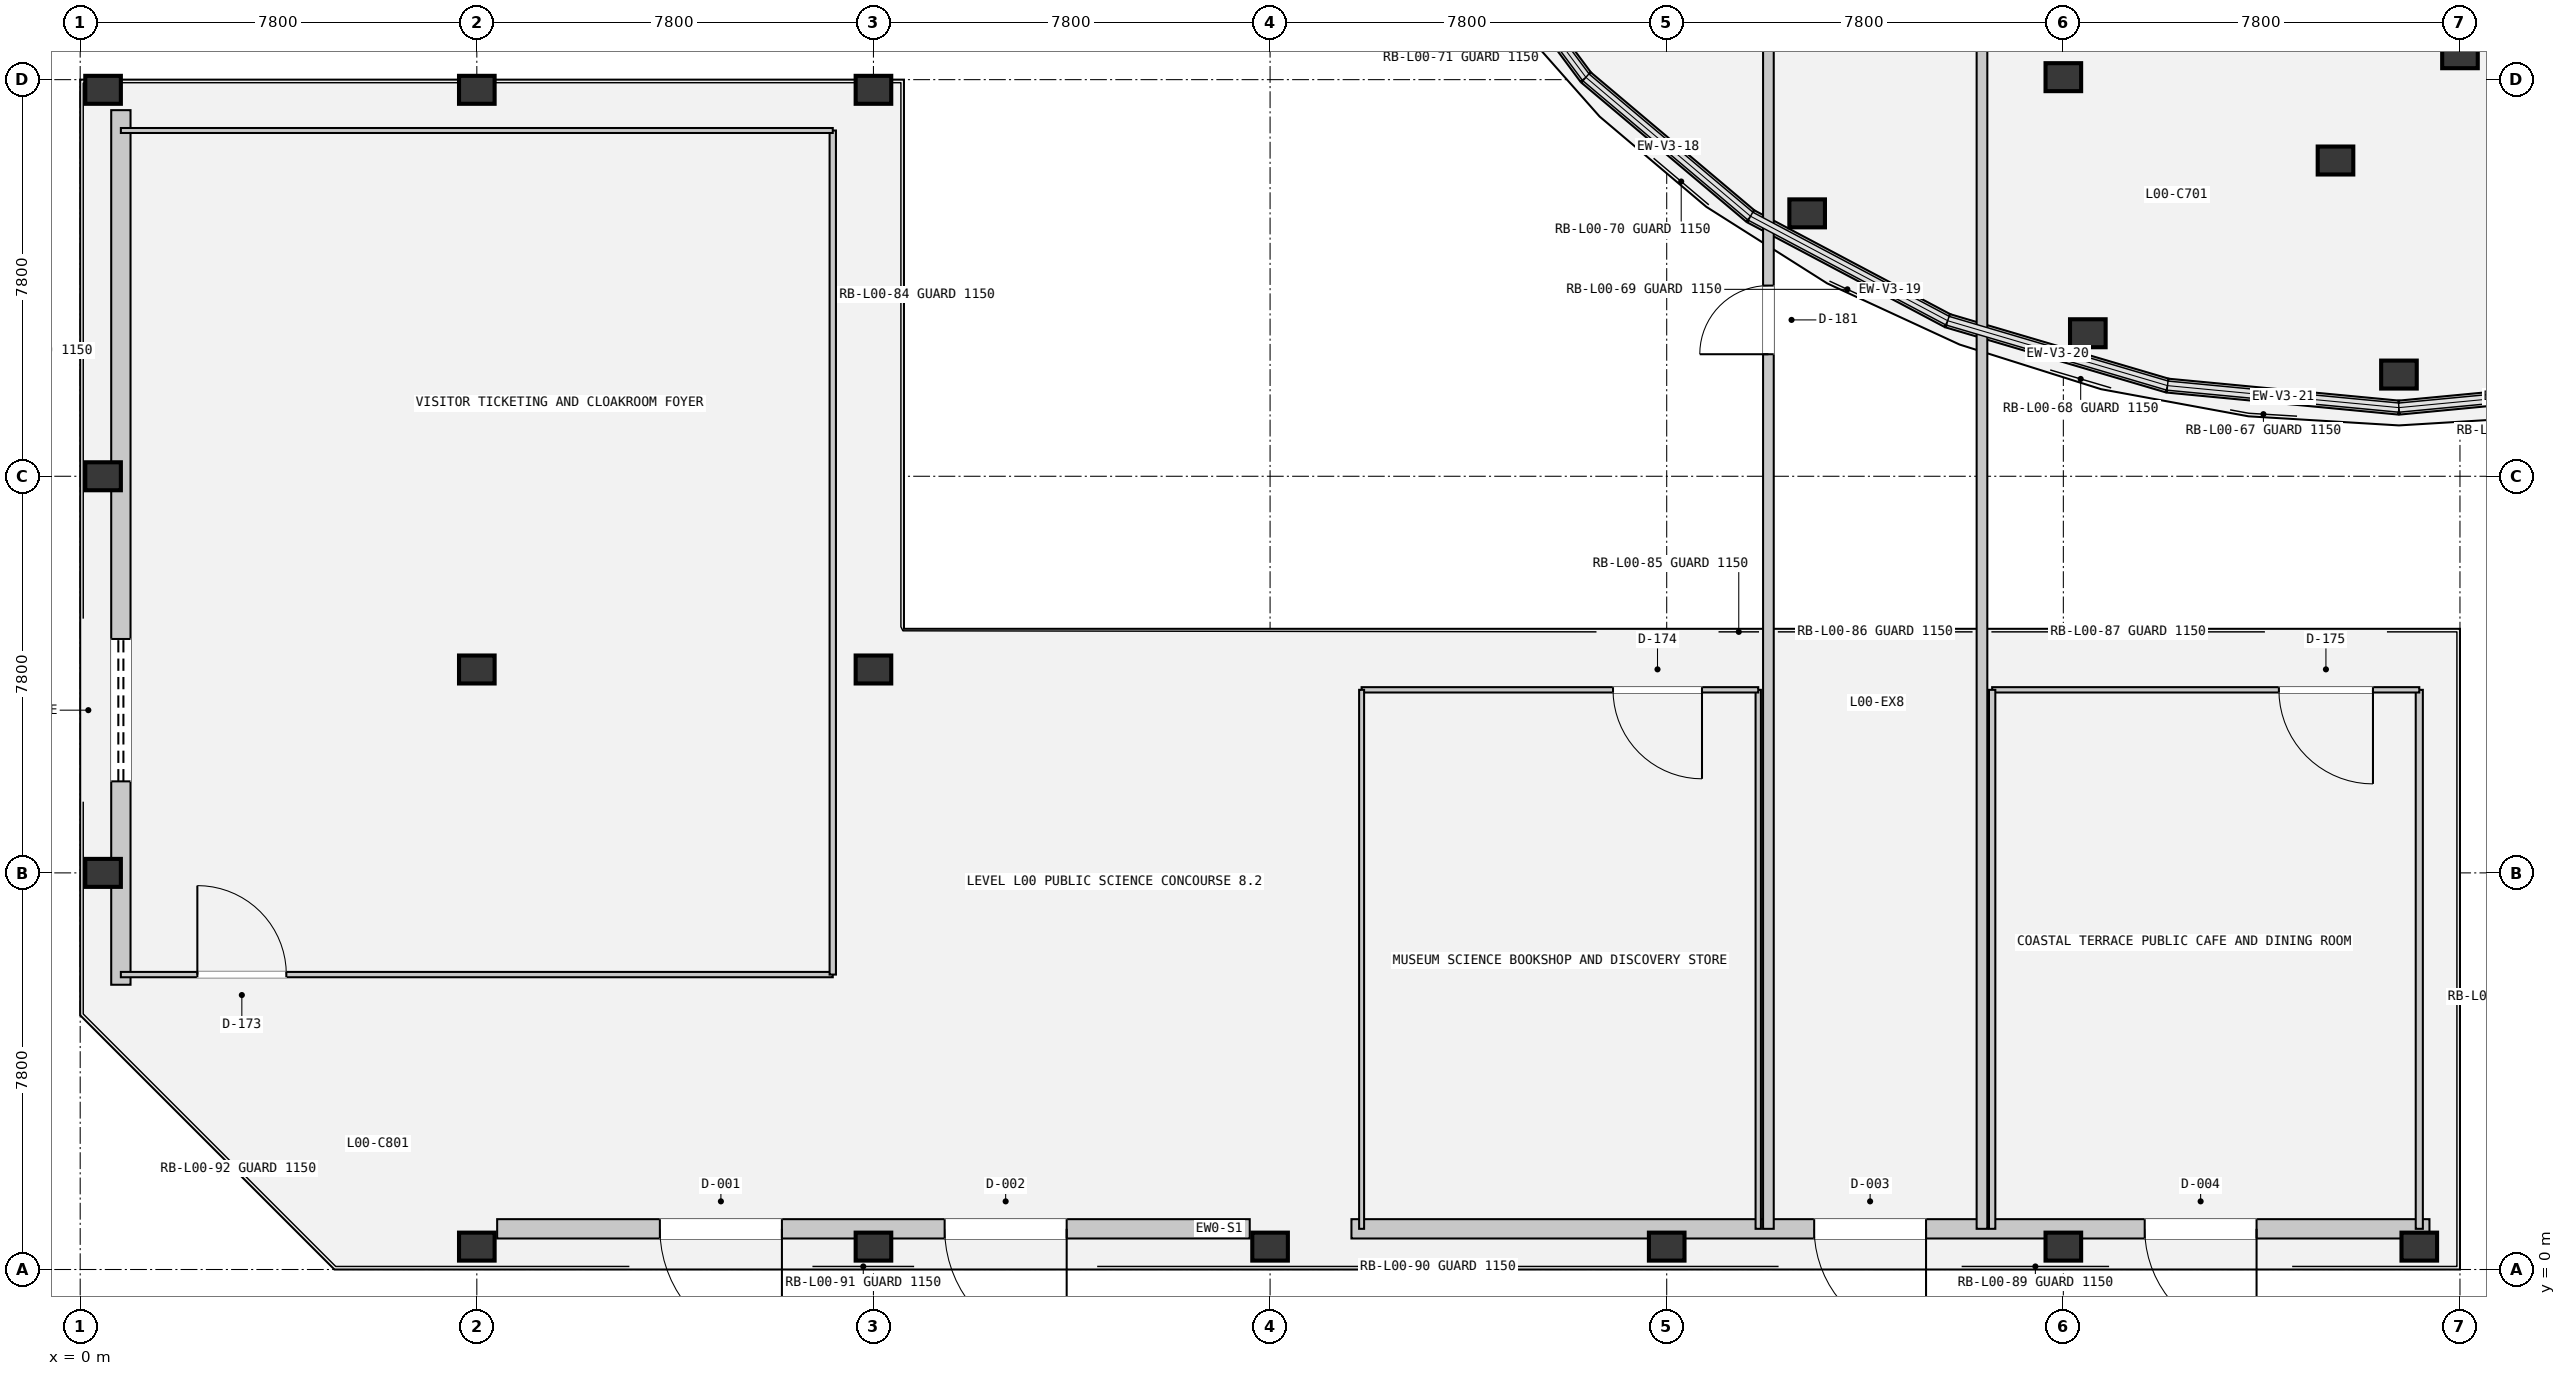
"""IFC4 building model, lengths in metres.
Left out: names, types, materials, properties, quantities, classifications, styles, units other than length and angle.
Written with IfcOpenShell. Run it as: python <this file> out.ifc"""

import sys

from ifc_helpers import new_model, si_unit, direction, frame, frame_2d, origin, origin_2d, place, context, subcontext, project, spatial, rectangle, extrude, element, fill, save


model = new_model("IFC4")
c1 = context("Model", 3, precision=1e-05, world=origin(), true_north=direction((0.0, 1.0)))
c2 = subcontext(c1, "Body", "Model", "MODEL_VIEW")
j1 = project(units=[si_unit("LENGTHUNIT", "METRE"), si_unit("PLANEANGLEUNIT", "RADIAN")], contexts=[c1])
p1 = place(None, origin())
s1 = spatial("IfcSite", under=j1, at=p1, CompositionType="ELEMENT")
p2 = place(p1, origin())
s2 = spatial("IfcBuilding", under=s1, at=p2, CompositionType="ELEMENT")
p3 = place(p2, origin())
s3 = spatial("IfcBuildingStorey", under=s2, at=p3, CompositionType="ELEMENT", Elevation=0.0)
for number, where, z_axis, x_axis in (
    (1, (39.0, 23.449, 0.0), (0.0, 0.0, 1.0), (1.0, 0.0, 0.0)),
    (2, (44.352, 21.81, 0.0), (0.0, 0.0, 1.0), (1.0, 0.0, 0.0)),
    (3, (33.962, 20.77, 0.0), (0.0, 0.0, 1.0), (1.0, 0.0, 0.0)),
    (4, (39.481, 18.413, 0.0), (0.0, 0.0, 1.0), (1.0, 0.0, 0.0)),
    (5, (45.6, 17.6, 0.0), (0.0, 0.0, 1.0), (1.0, 0.0, 0.0)),
    (6, (46.8, 23.9, 0.0), (0.0, 0.0, 1.0), (1.0, 0.0, 0.0)),
    (7, (0.45, 7.8, 0.0), (0.0, 0.0, 1.0), (1.0, 0.0, 0.0)),
    (8, (0.45, 15.6, 0.0), (0.0, 0.0, 1.0), (1.0, 0.0, 0.0)),
    (9, (0.45, 23.2, 0.0), (0.0, 0.0, 1.0), (1.0, 0.0, 0.0)),
    (10, (7.8, 0.45, 0.0), (0.0, 0.0, 1.0), (1.0, 0.0, 0.0)),
    (11, (15.6, 0.45, 0.0), (0.0, 0.0, 1.0), (1.0, 0.0, 0.0)),
    (12, (23.4, 0.45, 0.0), (0.0, 0.0, 1.0), (1.0, 0.0, 0.0)),
    (13, (31.2, 0.45, 0.0), (0.0, 0.0, 1.0), (1.0, 0.0, 0.0)),
    (14, (39.0, 0.45, 0.0), (0.0, 0.0, 1.0), (1.0, 0.0, 0.0)),
    (15, (46.0, 0.45, 0.0), (0.0, 0.0, 1.0), (1.0, 0.0, 0.0)),
    (16, (7.8, 11.8, 0.0), (0.0, 0.0, 1.0), (1.0, 0.0, 0.0)),
    (17, (15.6, 11.8, 0.0), (0.0, 0.0, 1.0), (1.0, 0.0, 0.0)),
    (18, (7.8, 23.2, 0.0), (0.0, 0.0, 1.0), (1.0, 0.0, 0.0)),
    (19, (15.6, 23.2, 0.0), (0.0, 0.0, 1.0), (1.0, 0.0, 0.0)),
):
    element("IfcColumn", number, at=place(p3, frame(where, z_axis=z_axis, x_axis=x_axis)), inside=s3, PredefinedType="COLUMN", context=c2, shape_type="SweptSolid", body=[
        extrude(rectangle(XDim=0.7, YDim=0.55, at=origin_2d()), origin(), (0.0, 0.0, 1.0), 5.4),
    ])
p4 = place(p3, frame((27.175, 26.716, 0.0), z_axis=(0.0, 0.0, 1.0), x_axis=(0.597362820345, -0.801971109747, 0.0)))
e20 = element("IfcWall", 20, at=p4, inside=s3, PredefinedType="SOLIDWALL", context=c2, shape_type="SweptSolid", body=[
    extrude(rectangle(XDim=4.078, YDim=0.275, at=frame_2d((2.039, 0.0))), origin(), (0.0, 0.0, 1.0), 1.02),
])
p5 = place(p3, frame((29.612, 23.445, 0.0), z_axis=(0.0, 0.0, 1.0), x_axis=(0.764366928563, -0.644781512234, 0.0)))
e21 = element("IfcWall", 21, at=p5, inside=s3, PredefinedType="SOLIDWALL", context=c2, shape_type="SweptSolid", body=[
    extrude(rectangle(XDim=4.236, YDim=0.275, at=frame_2d((2.118, 0.0))), origin(), (0.0, 0.0, 1.0), 1.02),
])
p6 = place(p3, frame((32.85, 20.713, 0.0), z_axis=(0.0, 0.0, 1.0), x_axis=(0.883560469247, -0.468317090425, 0.0)))
e22 = element("IfcWall", 22, at=p6, inside=s3, PredefinedType="SOLIDWALL", context=c2, shape_type="SweptSolid", body=[
    extrude(rectangle(XDim=4.388, YDim=0.275, at=frame_2d((2.194, 0.0))), origin(), (0.0, 0.0, 1.0), 1.02),
])
p7 = place(p3, frame((36.727, 18.658, 0.0), z_axis=(0.0, 0.0, 1.0), x_axis=(0.959101976786, -0.28306076755, 0.0)))
e23 = element("IfcWall", 23, at=p7, inside=s3, PredefinedType="SOLIDWALL", context=c2, shape_type="SweptSolid", body=[
    extrude(rectangle(XDim=4.507, YDim=0.275, at=frame_2d((2.253, 0.0))), origin(), (0.0, 0.0, 1.0), 1.02),
])
p8 = place(p3, frame((41.049, 17.383, 0.0), z_axis=(0.0, 0.0, 1.0), x_axis=(0.995511780068, -0.094637707848, 0.0)))
e24 = element("IfcWall", 24, at=p8, inside=s3, PredefinedType="SOLIDWALL", context=c2, shape_type="SweptSolid", body=[
    extrude(rectangle(XDim=4.571, YDim=0.275, at=frame_2d((2.286, 0.0))), origin(), (0.0, 0.0, 1.0), 1.02),
])
p9 = place(p3, frame((45.6, 16.95, 0.0), z_axis=(0.0, 0.0, 1.0), x_axis=(0.995511301698, 0.094642739772, 0.0)))
e25 = element("IfcWall", 25, at=p9, inside=s3, PredefinedType="SOLIDWALL", context=c2, shape_type="SweptSolid", body=[
    extrude(rectangle(XDim=4.571, YDim=0.275, at=frame_2d((2.286, 0.0))), origin(), (0.0, 0.0, 1.0), 1.02),
])
p10 = place(p3, frame((23.0, 0.8, 0.0), z_axis=(0.0, 0.0, 1.0), x_axis=(-1.0, 0.0, 0.0)))
e26 = element("IfcWall", 26, at=p10, inside=s3, PredefinedType="SOLIDWALL", context=c2, shape_type="SweptSolid", body=[
    extrude(rectangle(XDim=14.8, YDim=0.38, at=frame_2d((7.4, 0.0))), origin(), (0.0, 0.0, 1.0), 4.46),
])
p11 = place(p10, frame((9.2, 0.0, 0.0)))
e27 = element("IfcOpeningElement", 27, at=p11, cuts=e26, PredefinedType="OPENING", context=c2, shape_type="SweptSolid", body=[
    extrude(rectangle(XDim=2.4, YDim=2.6, at=frame_2d((1.2, 1.3))), frame((0.0, 0.2, 0.0), z_axis=(0.0, -1.0, 0.0), x_axis=(1.0, 0.0, 0.0)), (0.0, 0.0, 1.0), 0.4),
])
p12 = place(p10, frame((3.6, 0.0, 0.0)))
e28 = element("IfcOpeningElement", 28, at=p12, cuts=e26, PredefinedType="OPENING", context=c2, shape_type="SweptSolid", body=[
    extrude(rectangle(XDim=2.4, YDim=2.6, at=frame_2d((1.2, 1.3))), frame((0.0, 0.2, 0.0), z_axis=(0.0, -1.0, 0.0), x_axis=(1.0, 0.0, 0.0)), (0.0, 0.0, 1.0), 0.4),
])
p13 = place(p3, frame((46.2, 0.8, 0.0), z_axis=(0.0, 0.0, 1.0), x_axis=(-1.0, 0.0, 0.0)))
e29 = element("IfcWall", 29, at=p13, inside=s3, PredefinedType="SOLIDWALL", context=c2, shape_type="SweptSolid", body=[
    extrude(rectangle(XDim=21.2, YDim=0.38, at=frame_2d((10.6, 0.0))), origin(), (0.0, 0.0, 1.0), 4.46),
])
p14 = place(p13, frame((9.9, 0.0, 0.0)))
e30 = element("IfcOpeningElement", 30, at=p14, cuts=e29, PredefinedType="OPENING", context=c2, shape_type="SweptSolid", body=[
    extrude(rectangle(XDim=2.2, YDim=2.6, at=frame_2d((1.1, 1.3))), frame((0.0, 0.2, 0.0), z_axis=(0.0, -1.0, 0.0), x_axis=(1.0, 0.0, 0.0)), (0.0, 0.0, 1.0), 0.4),
])
p15 = place(p13, frame((3.4, 0.0, 0.0)))
e31 = element("IfcOpeningElement", 31, at=p15, cuts=e29, PredefinedType="OPENING", context=c2, shape_type="SweptSolid", body=[
    extrude(rectangle(XDim=2.2, YDim=2.6, at=frame_2d((1.1, 1.3))), frame((0.0, 0.2, 0.0), z_axis=(0.0, -1.0, 0.0), x_axis=(1.0, 0.0, 0.0)), (0.0, 0.0, 1.0), 0.4),
])
p16 = place(p3, frame((0.8, 5.6, 0.0), z_axis=(0.0, 0.0, 1.0), x_axis=(0.0, 1.0, 0.0)))
e32 = element("IfcWall", 32, at=p16, inside=s3, PredefinedType="SOLIDWALL", context=c2, shape_type="SweptSolid", body=[
    extrude(rectangle(XDim=17.2, YDim=0.38, at=frame_2d((8.6, 0.0))), origin(), (0.0, 0.0, 1.0), 4.46),
])
p17 = place(p16, frame((4.0, 0.0, 0.0)))
e33 = element("IfcOpeningElement", 33, at=p17, cuts=e32, PredefinedType="OPENING", context=c2, shape_type="SweptSolid", body=[
    extrude(rectangle(XDim=2.8, YDim=2.6, at=frame_2d((1.4, 1.3))), frame((0.0, 0.2, 0.0), z_axis=(0.0, -1.0, 0.0), x_axis=(1.0, 0.0, 0.0)), (0.0, 0.0, 1.0), 0.4),
])
p18 = place(p3, frame((0.8, 5.8, 0.0), z_axis=(0.0, 0.0, 1.0), x_axis=(1.0, 0.0, 0.0)))
e34 = element("IfcWall", 34, at=p18, inside=s3, PredefinedType="PARTITIONING", context=c2, shape_type="SweptSolid", body=[
    extrude(rectangle(XDim=14.0, YDim=0.105, at=frame_2d((7.0, 0.0))), origin(), (0.0, 0.0, 1.0), 3.45),
])
p19 = place(p18, frame((1.504, 0.0, 0.0)))
e35 = element("IfcOpeningElement", 35, at=p19, cuts=e34, PredefinedType="OPENING", context=c2, shape_type="SweptSolid", body=[
    extrude(rectangle(XDim=1.75, YDim=2.4, at=frame_2d((0.875, 1.2))), frame((0.0, 0.062, 0.0), z_axis=(0.0, -1.0, 0.0), x_axis=(1.0, 0.0, 0.0)), (0.0, 0.0, 1.0), 0.125),
])
p20 = place(p3, frame((14.8, 5.8, 0.0), z_axis=(0.0, 0.0, 1.0), x_axis=(0.0, 1.0, 0.0)))
e36 = element("IfcWall", 36, at=p20, inside=s3, PredefinedType="PARTITIONING", context=c2, shape_type="SweptSolid", body=[
    extrude(rectangle(XDim=16.6, YDim=0.125, at=frame_2d((8.3, 0.0))), origin(), (0.0, 0.0, 1.0), 3.45),
])
p21 = place(p3, frame((14.8, 22.4, 0.0), z_axis=(0.0, 0.0, 1.0), x_axis=(-1.0, 0.0, 0.0)))
e37 = element("IfcWall", 37, at=p21, inside=s3, PredefinedType="PARTITIONING", context=c2, shape_type="SweptSolid", body=[
    extrude(rectangle(XDim=14.0, YDim=0.098, at=frame_2d((7.0, 0.0))), origin(), (0.0, 0.0, 1.0), 3.45),
])
p22 = place(p3, frame((33.0, 0.8, 0.0), z_axis=(0.0, 0.0, 1.0), x_axis=(0.0, 1.0, 0.0)))
e38 = element("IfcWall", 38, at=p22, inside=s3, PredefinedType="PARTITIONING", context=c2, shape_type="SweptSolid", body=[
    extrude(rectangle(XDim=10.6, YDim=0.105, at=frame_2d((5.3, 0.0))), origin(), (0.0, 0.0, 1.0), 3.45),
])
p23 = place(p3, frame((33.0, 11.4, 0.0), z_axis=(0.0, 0.0, 1.0), x_axis=(-1.0, 0.0, 0.0)))
e39 = element("IfcWall", 39, at=p23, inside=s3, PredefinedType="PARTITIONING", context=c2, shape_type="SweptSolid", body=[
    extrude(rectangle(XDim=7.8, YDim=0.105, at=frame_2d((3.9, 0.0))), origin(), (0.0, 0.0, 1.0), 3.45),
])
p24 = place(p23, frame((1.106, 0.0, 0.0)))
e40 = element("IfcOpeningElement", 40, at=p24, cuts=e39, PredefinedType="OPENING", context=c2, shape_type="SweptSolid", body=[
    extrude(rectangle(XDim=1.75, YDim=2.4, at=frame_2d((0.875, 1.2))), frame((0.0, 0.062, 0.0), z_axis=(0.0, -1.0, 0.0), x_axis=(1.0, 0.0, 0.0)), (0.0, 0.0, 1.0), 0.125),
])
p25 = place(p3, frame((25.2, 11.4, 0.0), z_axis=(0.0, 0.0, 1.0), x_axis=(0.0, -1.0, 0.0)))
e41 = element("IfcWall", 41, at=p25, inside=s3, PredefinedType="PARTITIONING", context=c2, shape_type="SweptSolid", body=[
    extrude(rectangle(XDim=10.6, YDim=0.098, at=frame_2d((5.3, 0.0))), origin(), (0.0, 0.0, 1.0), 3.45),
])
p26 = place(p3, frame((46.0, 0.8, 0.0), z_axis=(0.0, 0.0, 1.0), x_axis=(0.0, 1.0, 0.0)))
e42 = element("IfcWall", 42, at=p26, inside=s3, PredefinedType="PARTITIONING", context=c2, shape_type="SweptSolid", body=[
    extrude(rectangle(XDim=10.6, YDim=0.14, at=frame_2d((5.3, 0.0))), origin(), (0.0, 0.0, 1.0), 3.45),
])
p27 = place(p3, frame((46.0, 11.4, 0.0), z_axis=(0.0, 0.0, 1.0), x_axis=(-1.0, 0.0, 0.0)))
e43 = element("IfcWall", 43, at=p27, inside=s3, PredefinedType="PARTITIONING", context=c2, shape_type="SweptSolid", body=[
    extrude(rectangle(XDim=8.4, YDim=0.105, at=frame_2d((4.2, 0.0))), origin(), (0.0, 0.0, 1.0), 3.45),
])
p28 = place(p27, frame((0.911, 0.0, 0.0)))
e44 = element("IfcOpeningElement", 44, at=p28, cuts=e43, PredefinedType="OPENING", context=c2, shape_type="SweptSolid", body=[
    extrude(rectangle(XDim=1.85, YDim=2.4, at=frame_2d((0.925, 1.2))), frame((0.0, 0.062, 0.0), z_axis=(0.0, -1.0, 0.0), x_axis=(1.0, 0.0, 0.0)), (0.0, 0.0, 1.0), 0.125),
])
p29 = place(p3, frame((37.6, 11.4, 0.0), z_axis=(0.0, 0.0, 1.0), x_axis=(0.0, -1.0, 0.0)))
e45 = element("IfcWall", 45, at=p29, inside=s3, PredefinedType="PARTITIONING", context=c2, shape_type="SweptSolid", body=[
    extrude(rectangle(XDim=10.6, YDim=0.125, at=frame_2d((5.3, 0.0))), origin(), (0.0, 0.0, 1.0), 3.45),
])
p30 = place(p3, frame((37.4, 0.8, 0.0), z_axis=(0.0, 0.0, 1.0), x_axis=(0.0, 1.0, 0.0)))
e46 = element("IfcWall", 46, at=p30, inside=s3, PredefinedType="PARTITIONING", context=c2, shape_type="SweptSolid", body=[
    extrude(rectangle(XDim=24.0, YDim=0.21, at=frame_2d((12.0, 0.0))), origin(), (0.0, 0.0, 1.0), 3.45),
])
p31 = place(p3, frame((33.2, 0.8, 0.0), z_axis=(0.0, 0.0, 1.0), x_axis=(0.0, 1.0, 0.0)))
e47 = element("IfcWall", 47, at=p31, inside=s3, PredefinedType="PARTITIONING", context=c2, shape_type="SweptSolid", body=[
    extrude(rectangle(XDim=24.0, YDim=0.21, at=frame_2d((12.0, 0.0))), origin(), (0.0, 0.0, 1.0), 3.45),
])
p32 = place(p31, frame((17.2, 0.0, 0.0)))
e48 = element("IfcOpeningElement", 48, at=p32, cuts=e47, PredefinedType="OPENING", context=c2, shape_type="SweptSolid", body=[
    extrude(rectangle(XDim=1.35, YDim=2.2, at=frame_2d((0.675, 1.1))), frame((0.0, 0.115, 0.0), z_axis=(0.0, -1.0, 0.0), x_axis=(1.0, 0.0, 0.0)), (0.0, 0.0, 1.0), 0.23),
])
p33 = place(p11, origin())
e49 = element("IfcDoor", 49, at=p33, inside=s3, OperationType="DOUBLE_DOOR_SINGLE_SWING", PredefinedType="DOOR", context=c2, shape_type="SweptSolid", body=[
    extrude(rectangle(XDim=2.4, YDim=2.6, at=frame_2d((1.2, 1.3))), frame((0.0, 0.025, 0.0), z_axis=(0.0, -1.0, 0.0), x_axis=(1.0, 0.0, 0.0)), (0.0, 0.0, 1.0), 0.05),
])
fill(e27, e49)
p34 = place(p12, origin())
e50 = element("IfcDoor", 50, at=p34, inside=s3, OperationType="DOUBLE_DOOR_SINGLE_SWING", PredefinedType="DOOR", context=c2, shape_type="SweptSolid", body=[
    extrude(rectangle(XDim=2.4, YDim=2.6, at=frame_2d((1.2, 1.3))), frame((0.0, 0.025, 0.0), z_axis=(0.0, -1.0, 0.0), x_axis=(1.0, 0.0, 0.0)), (0.0, 0.0, 1.0), 0.05),
])
fill(e28, e50)
p35 = place(p14, origin())
e51 = element("IfcDoor", 51, at=p35, inside=s3, OperationType="DOUBLE_DOOR_SINGLE_SWING", PredefinedType="DOOR", context=c2, shape_type="SweptSolid", body=[
    extrude(rectangle(XDim=2.2, YDim=2.6, at=frame_2d((1.1, 1.3))), frame((0.0, 0.025, 0.0), z_axis=(0.0, -1.0, 0.0), x_axis=(1.0, 0.0, 0.0)), (0.0, 0.0, 1.0), 0.05),
])
fill(e30, e51)
p36 = place(p15, origin())
e52 = element("IfcDoor", 52, at=p36, inside=s3, OperationType="DOUBLE_DOOR_SINGLE_SWING", PredefinedType="DOOR", context=c2, shape_type="SweptSolid", body=[
    extrude(rectangle(XDim=2.2, YDim=2.6, at=frame_2d((1.1, 1.3))), frame((0.0, 0.025, 0.0), z_axis=(0.0, -1.0, 0.0), x_axis=(1.0, 0.0, 0.0)), (0.0, 0.0, 1.0), 0.05),
])
fill(e31, e52)
p37 = place(p17, origin())
e53 = element("IfcDoor", 53, at=p37, inside=s3, OperationType="DOUBLE_DOOR_SINGLE_SWING", PredefinedType="GATE", context=c2, shape_type="SweptSolid", body=[
    extrude(rectangle(XDim=2.8, YDim=2.6, at=frame_2d((1.4, 1.3))), frame((0.0, 0.025, 0.0), z_axis=(0.0, -1.0, 0.0), x_axis=(1.0, 0.0, 0.0)), (0.0, 0.0, 1.0), 0.05),
])
fill(e33, e53)
p38 = place(p19, origin())
e54 = element("IfcDoor", 54, at=p38, inside=s3, OperationType="DOUBLE_DOOR_SINGLE_SWING", PredefinedType="DOOR", context=c2, shape_type="SweptSolid", body=[
    extrude(rectangle(XDim=1.75, YDim=2.4, at=frame_2d((0.875, 1.2))), frame((0.0, 0.025, 0.0), z_axis=(0.0, -1.0, 0.0), x_axis=(1.0, 0.0, 0.0)), (0.0, 0.0, 1.0), 0.05),
])
fill(e35, e54)
p39 = place(p24, origin())
e55 = element("IfcDoor", 55, at=p39, inside=s3, OperationType="DOUBLE_DOOR_SINGLE_SWING", PredefinedType="DOOR", context=c2, shape_type="SweptSolid", body=[
    extrude(rectangle(XDim=1.75, YDim=2.4, at=frame_2d((0.875, 1.2))), frame((0.0, 0.025, 0.0), z_axis=(0.0, -1.0, 0.0), x_axis=(1.0, 0.0, 0.0)), (0.0, 0.0, 1.0), 0.05),
])
fill(e40, e55)
p40 = place(p28, origin())
e56 = element("IfcDoor", 56, at=p40, inside=s3, OperationType="DOUBLE_DOOR_SINGLE_SWING", PredefinedType="DOOR", context=c2, shape_type="SweptSolid", body=[
    extrude(rectangle(XDim=1.85, YDim=2.4, at=frame_2d((0.925, 1.2))), frame((0.0, 0.025, 0.0), z_axis=(0.0, -1.0, 0.0), x_axis=(1.0, 0.0, 0.0)), (0.0, 0.0, 1.0), 0.05),
])
fill(e44, e56)
p41 = place(p32, origin())
e57 = element("IfcDoor", 57, at=p41, inside=s3, OperationType="SINGLE_SWING_RIGHT", PredefinedType="DOOR", context=c2, shape_type="SweptSolid", body=[
    extrude(rectangle(XDim=1.35, YDim=2.2, at=frame_2d((0.675, 1.1))), frame((0.0, 0.025, 0.0), z_axis=(0.0, -1.0, 0.0), x_axis=(1.0, 0.0, 0.0)), (0.0, 0.0, 1.0), 0.05),
])
fill(e48, e57)
save(model, sys.argv[1])
